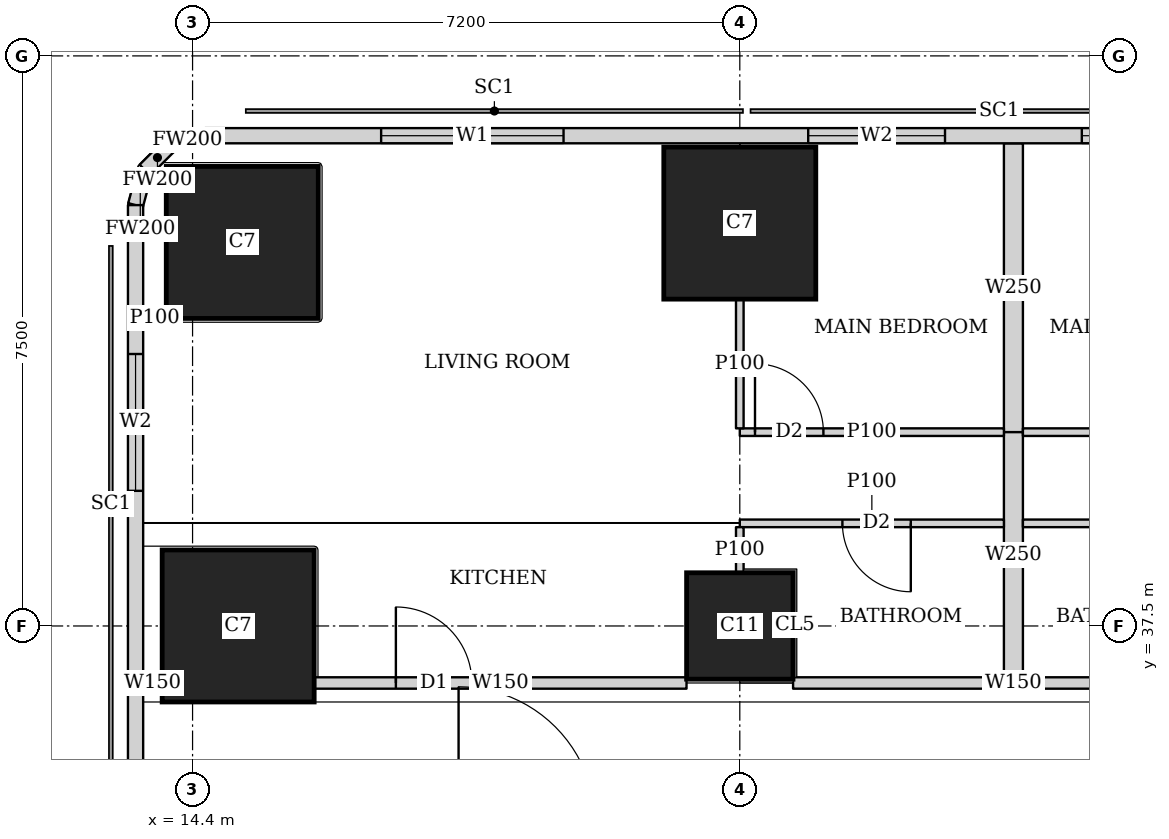
"""IFC4 building model, lengths in metres.
Left out: names, types, materials, properties, quantities, classifications, styles, units other than length and angle.
Written with IfcOpenShell. Run it as: python <this file> out.ifc"""

import sys

from ifc_helpers import new_model, si_unit, direction, frame, frame_2d, origin, origin_2d, place, context, subcontext, project, spatial, rectangle, extrude, element, fill, save


model = new_model("IFC4")
c1 = context("Model", 3, precision=1e-05, world=origin(), true_north=direction((0.0, 1.0)))
c2 = subcontext(c1, "Body", "Model", "MODEL_VIEW")
j1 = project(units=[si_unit("LENGTHUNIT", "METRE"), si_unit("PLANEANGLEUNIT", "RADIAN")], contexts=[c1])
p1 = place(None, origin())
s1 = spatial("IfcSite", under=j1, at=p1, CompositionType="ELEMENT")
p2 = place(p1, origin())
s2 = spatial("IfcBuilding", under=s1, at=p2, CompositionType="ELEMENT")
p3 = place(p2, frame((0.0, 0.0, 259.1)))
s3 = spatial("IfcBuildingStorey", under=s2, at=p3, CompositionType="ELEMENT", Elevation=259.1)
p4 = place(p3, frame((15.0, 37.5, 0.0), z_axis=(0.0, 0.0, 1.0), x_axis=(1.0, 0.0, 0.0)))
e1 = element("IfcColumn", 1, at=p4, inside=s3, PredefinedType="COLUMN", context=c2, shape_type="SweptSolid", body=[
    extrude(rectangle(XDim=2.0, YDim=2.0, at=origin_2d()), origin(), (0.0, 0.0, 1.0), 3.75),
])
p5 = place(p3, frame((21.6, 37.5, 0.0), z_axis=(0.0, 0.0, 1.0), x_axis=(1.0, 0.0, 0.0)))
e2 = element("IfcColumn", 2, at=p5, inside=s3, PredefinedType="COLUMN", context=c2, shape_type="SweptSolid", body=[
    extrude(rectangle(XDim=1.4, YDim=1.4, at=origin_2d()), origin(), (0.0, 0.0, 1.0), 3.75),
])
for number, where, z_axis, x_axis in (
    (3, (15.054, 42.546, 0.0), (0.0, 0.0, 1.0), (1.0, 0.0, 0.0)),
    (4, (21.6, 42.8, 0.0), (0.0, 0.0, 1.0), (1.0, 0.0, 0.0)),
):
    element("IfcColumn", number, at=place(p3, frame(where, z_axis=z_axis, x_axis=x_axis)), inside=s3, PredefinedType="COLUMN", context=c2, shape_type="SweptSolid", body=[
        extrude(rectangle(XDim=2.0, YDim=2.0, at=origin_2d()), origin(), (0.0, 0.0, 1.0), 3.75),
    ])
p6 = place(p3, frame((42.103, 43.95, 0.0), z_axis=(0.0, 0.0, 1.0), x_axis=(-1.0, 0.0, 0.0)))
e5 = element("IfcWall", 5, at=p6, inside=s3, PredefinedType="SOLIDWALL", context=c2, shape_type="SweptSolid", body=[
    extrude(rectangle(XDim=27.54, YDim=0.2, at=frame_2d((13.77, 0.0))), origin(), (0.0, 0.0, 1.0), 3.5),
])
p7 = place(p6, frame((10.603, 0.0, 0.9)))
e6 = element("IfcOpeningElement", 6, at=p7, cuts=e5, PredefinedType="OPENING", context=c2, shape_type="SweptSolid", body=[
    extrude(rectangle(XDim=1.8, YDim=1.5, at=frame_2d((0.9, 0.75))), frame((0.0, 0.11, 0.0), z_axis=(0.0, -1.0, 0.0), x_axis=(1.0, 0.0, 0.0)), (0.0, 0.0, 1.0), 0.22),
])
p8 = place(p6, frame((14.203, 0.0, 0.9)))
e7 = element("IfcOpeningElement", 7, at=p8, cuts=e5, PredefinedType="OPENING", context=c2, shape_type="SweptSolid", body=[
    extrude(rectangle(XDim=1.8, YDim=1.5, at=frame_2d((0.9, 0.75))), frame((0.0, 0.11, 0.0), z_axis=(0.0, -1.0, 0.0), x_axis=(1.0, 0.0, 0.0)), (0.0, 0.0, 1.0), 0.22),
])
p9 = place(p6, frame((17.803, 0.0, 0.9)))
e8 = element("IfcOpeningElement", 8, at=p9, cuts=e5, PredefinedType="OPENING", context=c2, shape_type="SweptSolid", body=[
    extrude(rectangle(XDim=1.8, YDim=1.5, at=frame_2d((0.9, 0.75))), frame((0.0, 0.11, 0.0), z_axis=(0.0, -1.0, 0.0), x_axis=(1.0, 0.0, 0.0)), (0.0, 0.0, 1.0), 0.22),
])
p10 = place(p6, frame((22.822, 0.0, 0.9)))
e9 = element("IfcOpeningElement", 9, at=p10, cuts=e5, PredefinedType="OPENING", context=c2, shape_type="SweptSolid", body=[
    extrude(rectangle(XDim=2.4, YDim=1.5, at=frame_2d((1.2, 0.75))), frame((0.0, 0.11, 0.0), z_axis=(0.0, -1.0, 0.0), x_axis=(1.0, 0.0, 0.0)), (0.0, 0.0, 1.0), 0.22),
])
p11 = place(p3, frame((14.563, 43.95, 0.0), z_axis=(0.0, 0.0, 1.0), x_axis=(-0.965655254015, -0.259826731483, 0.0)))
e10 = element("IfcWall", 10, at=p11, inside=s3, PredefinedType="SOLIDWALL", context=c2, shape_type="SweptSolid", body=[
    extrude(rectangle(XDim=0.477, YDim=0.2, at=frame_2d((0.239, 0.0))), origin(), (0.0, 0.0, 1.0), 3.5),
])
p12 = place(p3, frame((14.102, 43.826, 0.0), z_axis=(0.0, 0.0, 1.0), x_axis=(-0.707369890659, -0.706843573776, 0.0)))
e11 = element("IfcWall", 11, at=p12, inside=s3, PredefinedType="SOLIDWALL", context=c2, shape_type="SweptSolid", body=[
    extrude(rectangle(XDim=0.464, YDim=0.2, at=frame_2d((0.232, 0.0))), origin(), (0.0, 0.0, 1.0), 3.5),
])
p13 = place(p3, frame((13.774, 43.498, 0.0), z_axis=(0.0, 0.0, 1.0), x_axis=(-0.259826731483, -0.965655254015, 0.0)))
e12 = element("IfcWall", 12, at=p13, inside=s3, PredefinedType="SOLIDWALL", context=c2, shape_type="SweptSolid", body=[
    extrude(rectangle(XDim=0.477, YDim=0.2, at=frame_2d((0.239, 0.0))), origin(), (0.0, 0.0, 1.0), 3.5),
])
p14 = place(p3, frame((13.65, 43.037, 0.0), z_axis=(0.0, 0.0, 1.0), x_axis=(0.0, -1.0, 0.0)))
e13 = element("IfcWall", 13, at=p14, inside=s3, PredefinedType="SOLIDWALL", context=c2, shape_type="SweptSolid", body=[
    extrude(rectangle(XDim=35.374, YDim=0.2, at=frame_2d((17.687, 0.0))), origin(), (0.0, 0.0, 1.0), 3.5),
])
p15 = place(p14, frame((1.959, 0.0, 0.9)))
e14 = element("IfcOpeningElement", 14, at=p15, cuts=e13, PredefinedType="OPENING", context=c2, shape_type="SweptSolid", body=[
    extrude(rectangle(XDim=1.8, YDim=1.5, at=frame_2d((0.9, 0.75))), frame((0.0, 0.11, 0.0), z_axis=(0.0, -1.0, 0.0), x_axis=(1.0, 0.0, 0.0)), (0.0, 0.0, 1.0), 0.22),
])
p16 = place(p3, frame((13.75, 36.75, 0.0), z_axis=(0.0, 0.0, 1.0), x_axis=(1.0, 0.0, 0.0)))
e15 = element("IfcWall", 15, at=p16, inside=s3, PredefinedType="SOLIDWALL", context=c2, shape_type="SweptSolid", body=[
    extrude(rectangle(XDim=0.249, YDim=0.15, at=frame_2d((0.125, 0.0))), origin(), (0.0, 0.0, 1.0), 3.5),
])
p17 = place(p3, frame((16.001, 36.75, 0.0), z_axis=(0.0, 0.0, 1.0), x_axis=(1.0, 0.0, 0.0)))
e16 = element("IfcWall", 16, at=p17, inside=s3, PredefinedType="SOLIDWALL", context=c2, shape_type="SweptSolid", body=[
    extrude(rectangle(XDim=4.898, YDim=0.15, at=frame_2d((2.449, 0.0))), origin(), (0.0, 0.0, 1.0), 3.5),
])
p18 = place(p17, frame((1.074, 0.0, 0.0)))
e17 = element("IfcOpeningElement", 17, at=p18, cuts=e16, PredefinedType="OPENING", context=c2, shape_type="SweptSolid", body=[
    extrude(rectangle(XDim=1.0, YDim=2.1, at=frame_2d((0.5, 1.05))), frame((0.0, 0.085, 0.0), z_axis=(0.0, -1.0, 0.0), x_axis=(1.0, 0.0, 0.0)), (0.0, 0.0, 1.0), 0.17),
])
p19 = place(p3, frame((22.301, 36.75, 0.0), z_axis=(0.0, 0.0, 1.0), x_axis=(1.0, 0.0, 0.0)))
e18 = element("IfcWall", 18, at=p19, inside=s3, PredefinedType="SOLIDWALL", context=c2, shape_type="SweptSolid", body=[
    extrude(rectangle(XDim=5.798, YDim=0.15, at=frame_2d((2.899, 0.0))), origin(), (0.0, 0.0, 1.0), 3.5),
])
p20 = place(p3, frame((14.054, 41.546, 0.0), z_axis=(0.0, 0.0, 1.0), x_axis=(-1.0, 0.0, 0.0)))
e19 = element("IfcWall", 19, at=p20, inside=s3, PredefinedType="PARTITIONING", context=c2, shape_type="SweptSolid", body=[
    extrude(rectangle(XDim=0.304, YDim=0.1, at=frame_2d((0.152, 0.0))), origin(), (0.0, 0.0, 1.0), 3.5),
])
p21 = place(p3, frame((21.6, 40.05, 0.0), z_axis=(0.0, 0.0, 1.0), x_axis=(1.0, 0.0, 0.0)))
e20 = element("IfcWall", 20, at=p21, inside=s3, PredefinedType="PARTITIONING", context=c2, shape_type="SweptSolid", body=[
    extrude(rectangle(XDim=3.475, YDim=0.1, at=frame_2d((1.737, 0.0))), origin(), (0.0, 0.0, 1.0), 3.5),
])
p22 = place(p21, frame((0.2, 0.0, 0.0)))
e21 = element("IfcOpeningElement", 21, at=p22, cuts=e20, PredefinedType="OPENING", context=c2, shape_type="SweptSolid", body=[
    extrude(rectangle(XDim=0.9, YDim=2.1, at=frame_2d((0.45, 1.05))), frame((0.0, 0.06, 0.0), z_axis=(0.0, -1.0, 0.0), x_axis=(1.0, 0.0, 0.0)), (0.0, 0.0, 1.0), 0.12),
])
p23 = place(p3, frame((21.6, 38.85, 0.0), z_axis=(0.0, 0.0, 1.0), x_axis=(1.0, 0.0, 0.0)))
e22 = element("IfcWall", 22, at=p23, inside=s3, PredefinedType="PARTITIONING", context=c2, shape_type="SweptSolid", body=[
    extrude(rectangle(XDim=3.475, YDim=0.1, at=frame_2d((1.737, 0.0))), origin(), (0.0, 0.0, 1.0), 3.5),
])
p24 = place(p23, frame((1.35, 0.0, 0.0)))
e23 = element("IfcOpeningElement", 23, at=p24, cuts=e22, PredefinedType="OPENING", context=c2, shape_type="SweptSolid", body=[
    extrude(rectangle(XDim=0.9, YDim=2.1, at=frame_2d((0.45, 1.05))), frame((0.0, 0.06, 0.0), z_axis=(0.0, -1.0, 0.0), x_axis=(1.0, 0.0, 0.0)), (0.0, 0.0, 1.0), 0.12),
])
p25 = place(p3, frame((21.6, 40.1, 0.0), z_axis=(0.0, 0.0, 1.0), x_axis=(0.0, 1.0, 0.0)))
e24 = element("IfcWall", 24, at=p25, inside=s3, PredefinedType="PARTITIONING", context=c2, shape_type="SweptSolid", body=[
    extrude(rectangle(XDim=1.699, YDim=0.1, at=frame_2d((0.85, 0.0))), origin(), (0.0, 0.0, 1.0), 3.5),
])
p26 = place(p3, frame((21.6, 38.201, 0.0), z_axis=(0.0, 0.0, 1.0), x_axis=(0.0, 1.0, 0.0)))
e25 = element("IfcWall", 25, at=p26, inside=s3, PredefinedType="PARTITIONING", context=c2, shape_type="SweptSolid", body=[
    extrude(rectangle(XDim=0.599, YDim=0.1, at=frame_2d((0.3, 0.0))), origin(), (0.0, 0.0, 1.0), 3.5),
])
p27 = place(p3, frame((25.325, 40.05, 0.0), z_axis=(0.0, 0.0, 1.0), x_axis=(1.0, 0.0, 0.0)))
e26 = element("IfcWall", 26, at=p27, inside=s3, PredefinedType="PARTITIONING", context=c2, shape_type="SweptSolid", body=[
    extrude(rectangle(XDim=3.475, YDim=0.1, at=frame_2d((1.738, 0.0))), origin(), (0.0, 0.0, 1.0), 3.5),
])
p28 = place(p27, frame((2.375, 0.0, 0.0)))
e27 = element("IfcOpeningElement", 27, at=p28, cuts=e26, PredefinedType="OPENING", context=c2, shape_type="SweptSolid", body=[
    extrude(rectangle(XDim=0.9, YDim=2.1, at=frame_2d((0.45, 1.05))), frame((0.0, 0.06, 0.0), z_axis=(0.0, -1.0, 0.0), x_axis=(1.0, 0.0, 0.0)), (0.0, 0.0, 1.0), 0.12),
])
p29 = place(p3, frame((25.325, 38.85, 0.0), z_axis=(0.0, 0.0, 1.0), x_axis=(1.0, 0.0, 0.0)))
e28 = element("IfcWall", 28, at=p29, inside=s3, PredefinedType="PARTITIONING", context=c2, shape_type="SweptSolid", body=[
    extrude(rectangle(XDim=3.475, YDim=0.1, at=frame_2d((1.738, 0.0))), origin(), (0.0, 0.0, 1.0), 3.5),
])
p30 = place(p29, frame((1.225, 0.0, 0.0)))
e29 = element("IfcOpeningElement", 29, at=p30, cuts=e28, PredefinedType="OPENING", context=c2, shape_type="SweptSolid", body=[
    extrude(rectangle(XDim=0.9, YDim=2.1, at=frame_2d((0.45, 1.05))), frame((0.0, 0.06, 0.0), z_axis=(0.0, -1.0, 0.0), x_axis=(1.0, 0.0, 0.0)), (0.0, 0.0, 1.0), 0.12),
])
p31 = place(p3, frame((25.2, 40.05, 0.0), z_axis=(0.0, 0.0, 1.0), x_axis=(0.0, 1.0, 0.0)))
e30 = element("IfcWall", 30, at=p31, inside=s3, PredefinedType="SOLIDWALL", context=c2, shape_type="SweptSolid", body=[
    extrude(rectangle(XDim=3.8, YDim=0.25, at=frame_2d((1.9, 0.0))), origin(), (0.0, 0.0, 1.0), 2.05),
])
p32 = place(p3, frame((25.2, 36.825, 0.0), z_axis=(0.0, 0.0, 1.0), x_axis=(0.0, 1.0, 0.0)))
e31 = element("IfcWall", 31, at=p32, inside=s3, PredefinedType="SOLIDWALL", context=c2, shape_type="SweptSolid", body=[
    extrude(rectangle(XDim=3.225, YDim=0.25, at=frame_2d((1.613, 0.0))), origin(), (0.0, 0.0, 1.0), 3.5),
])
p33 = place(p8, origin())
e32 = element("IfcWindow", 32, at=p33, inside=s3, PartitioningType="SINGLE_PANEL", PredefinedType="WINDOW", context=c2, shape_type="SweptSolid", body=[
    extrude(rectangle(XDim=1.8, YDim=1.5, at=frame_2d((0.9, 0.75))), frame((0.0, 0.03, 0.0), z_axis=(0.0, -1.0, 0.0), x_axis=(1.0, 0.0, 0.0)), (0.0, 0.0, 1.0), 0.06),
])
fill(e7, e32)
p34 = place(p9, origin())
e33 = element("IfcWindow", 33, at=p34, inside=s3, PartitioningType="SINGLE_PANEL", PredefinedType="WINDOW", context=c2, shape_type="SweptSolid", body=[
    extrude(rectangle(XDim=1.8, YDim=1.5, at=frame_2d((0.9, 0.75))), frame((0.0, 0.03, 0.0), z_axis=(0.0, -1.0, 0.0), x_axis=(1.0, 0.0, 0.0)), (0.0, 0.0, 1.0), 0.06),
])
fill(e8, e33)
p35 = place(p10, origin())
e34 = element("IfcWindow", 34, at=p35, inside=s3, PartitioningType="SINGLE_PANEL", PredefinedType="WINDOW", context=c2, shape_type="SweptSolid", body=[
    extrude(rectangle(XDim=2.4, YDim=1.5, at=frame_2d((1.2, 0.75))), frame((0.0, 0.03, 0.0), z_axis=(0.0, -1.0, 0.0), x_axis=(1.0, 0.0, 0.0)), (0.0, 0.0, 1.0), 0.06),
])
fill(e9, e34)
p36 = place(p15, origin())
e35 = element("IfcWindow", 35, at=p36, inside=s3, PartitioningType="SINGLE_PANEL", PredefinedType="WINDOW", context=c2, shape_type="SweptSolid", body=[
    extrude(rectangle(XDim=1.8, YDim=1.5, at=frame_2d((0.9, 0.75))), frame((0.0, 0.03, 0.0), z_axis=(0.0, -1.0, 0.0), x_axis=(1.0, 0.0, 0.0)), (0.0, 0.0, 1.0), 0.06),
])
fill(e14, e35)
p37 = place(p22, origin())
e36 = element("IfcDoor", 36, at=p37, inside=s3, OperationType="SINGLE_SWING_LEFT", PredefinedType="DOOR", context=c2, shape_type="SweptSolid", body=[
    extrude(rectangle(XDim=0.9, YDim=2.1, at=frame_2d((0.45, 1.05))), frame((0.0, 0.025, 0.0), z_axis=(0.0, -1.0, 0.0), x_axis=(1.0, 0.0, 0.0)), (0.0, 0.0, 1.0), 0.05),
])
fill(e21, e36)
p38 = place(p24, origin())
e37 = element("IfcDoor", 37, at=p38, inside=s3, OperationType="SINGLE_SWING_LEFT", PredefinedType="DOOR", context=c2, shape_type="SweptSolid", body=[
    extrude(rectangle(XDim=0.9, YDim=2.1, at=frame_2d((0.45, 1.05))), frame((0.0, 0.025, 0.0), z_axis=(0.0, -1.0, 0.0), x_axis=(1.0, 0.0, 0.0)), (0.0, 0.0, 1.0), 0.05),
])
fill(e23, e37)
p39 = place(p18, origin())
e38 = element("IfcDoor", 38, at=p39, inside=s3, OperationType="SINGLE_SWING_LEFT", PredefinedType="DOOR", context=c2, shape_type="SweptSolid", body=[
    extrude(rectangle(XDim=1.0, YDim=2.1, at=frame_2d((0.5, 1.05))), frame((0.0, 0.025, 0.0), z_axis=(0.0, -1.0, 0.0), x_axis=(1.0, 0.0, 0.0)), (0.0, 0.0, 1.0), 0.05),
])
fill(e17, e38)
save(model, sys.argv[1])
